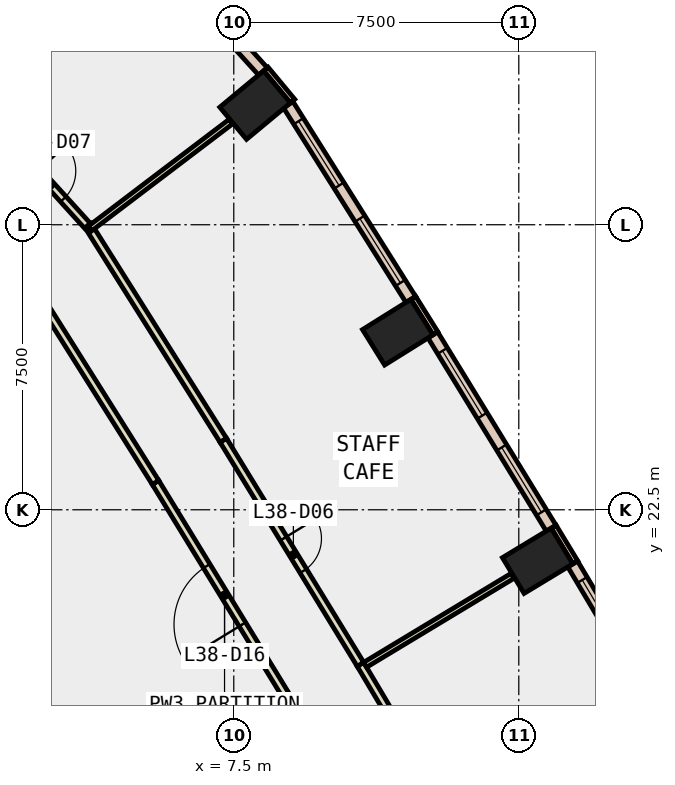
"""IFC4 building model, lengths in metres.
Left out: names, types, materials, properties, quantities, classifications, styles, units other than length and angle.
Written with IfcOpenShell. Run it as: python <this file> out.ifc"""

import sys

from ifc_helpers import new_model, si_unit, direction, frame, frame_2d, origin, origin_2d, place, context, subcontext, project, spatial, rectangle, extrude, element, fill, save


model = new_model("IFC4")
c1 = context("Model", 3, precision=1e-05, world=origin(), true_north=direction((0.0, 1.0)))
c2 = subcontext(c1, "Body", "Model", "MODEL_VIEW")
j1 = project(units=[si_unit("LENGTHUNIT", "METRE"), si_unit("PLANEANGLEUNIT", "RADIAN")], contexts=[c1])
p1 = place(None, origin())
s1 = spatial("IfcSite", under=j1, at=p1, CompositionType="ELEMENT")
p2 = place(p1, origin())
s2 = spatial("IfcBuilding", under=s1, at=p2, CompositionType="ELEMENT")
p3 = place(p2, frame((0.0, 0.0, 171.8)))
s3 = spatial("IfcBuildingStorey", under=s2, at=p3, CompositionType="ELEMENT", Elevation=171.8)
for number, where, z_axis, x_axis in (
    (1, (15.496, 21.158, -0.4), (0.0, 0.0, 1.0), (-0.518, 0.855, 0.0)),
    (2, (11.815, 27.172, -0.4), (0.0, 0.0, 1.0), (-0.53, 0.848, 0.0)),
    (3, (8.061, 33.149, -0.4), (0.0, 0.0, 1.0), (-0.639, 0.769, 0.0)),
):
    element("IfcColumn", number, at=place(p3, frame(where, z_axis=z_axis, x_axis=x_axis)), inside=s3, PredefinedType="COLUMN", context=c2, shape_type="SweptSolid", body=[
        extrude(rectangle(XDim=1.1, YDim=1.5, at=origin_2d()), origin(), (0.0, 0.0, 1.0), 4.2),
    ])
for number, where, z_axis, x_axis in (
    (4, (16.487, 21.115, 0.0), (0.0, 0.0, 1.0), (-0.518, 0.855, 0.0)),
    (5, (12.806, 27.143, 0.0), (0.0, 0.0, 1.0), (-0.53, 0.848, 0.0)),
    (6, (9.047, 33.253, 0.0), (0.0, 0.0, 1.0), (-0.639, 0.769, 0.0)),
):
    element("IfcWall", number, at=place(p3, frame(where, z_axis=z_axis, x_axis=x_axis)), inside=s3, PredefinedType="STANDARD", context=c2, shape_type="SweptSolid", body=[
        extrude(rectangle(XDim=1.1, YDim=0.15, at=frame_2d((0.55, 0.0))), origin(), (0.0, 0.0, 1.0), 3.8),
    ])
p4 = place(p3, frame((19.465, 15.949, 0.0), z_axis=(0.0, 0.0, 1.0), x_axis=(-0.511053317394, 0.8595490136, 0.0)))
e7 = element("IfcWall", 7, at=p4, inside=s3, PredefinedType="STANDARD", context=c2, shape_type="SweptSolid", body=[
    extrude(rectangle(XDim=5.962, YDim=0.3, at=frame_2d((2.981, 0.0))), origin(), (0.0, 0.0, 1.0), 3.8),
])
p5 = place(p4, frame((0.491, 0.0, 0.9)))
e8 = element("IfcOpeningElement", 8, at=p5, cuts=e7, PredefinedType="OPENING", context=c2, shape_type="SweptSolid", body=[
    extrude(rectangle(XDim=2.0, YDim=2.6, at=frame_2d((1.0, 1.3))), frame((0.0, 0.16, 0.0), z_axis=(0.0, -1.0, 0.0), x_axis=(1.0, 0.0, 0.0)), (0.0, 0.0, 1.0), 0.32),
])
p6 = place(p4, frame((3.472, 0.0, 0.9)))
e9 = element("IfcOpeningElement", 9, at=p6, cuts=e7, PredefinedType="OPENING", context=c2, shape_type="SweptSolid", body=[
    extrude(rectangle(XDim=2.0, YDim=2.6, at=frame_2d((1.0, 1.3))), frame((0.0, 0.16, 0.0), z_axis=(0.0, -1.0, 0.0), x_axis=(1.0, 0.0, 0.0)), (0.0, 0.0, 1.0), 0.32),
])
p7 = place(p3, frame((15.851, 22.015, 0.0), z_axis=(0.0, 0.0, 1.0), x_axis=(-0.522156898008, 0.852849443842, 0.0)))
e10 = element("IfcWall", 10, at=p7, inside=s3, PredefinedType="STANDARD", context=c2, shape_type="SweptSolid", body=[
    extrude(rectangle(XDim=5.964, YDim=0.3, at=frame_2d((2.982, 0.0))), origin(), (0.0, 0.0, 1.0), 3.8),
])
p8 = place(p7, frame((0.491, 0.0, 0.9)))
e11 = element("IfcOpeningElement", 11, at=p8, cuts=e10, PredefinedType="OPENING", context=c2, shape_type="SweptSolid", body=[
    extrude(rectangle(XDim=2.0, YDim=2.6, at=frame_2d((1.0, 1.3))), frame((0.0, 0.16, 0.0), z_axis=(0.0, -1.0, 0.0), x_axis=(1.0, 0.0, 0.0)), (0.0, 0.0, 1.0), 0.32),
])
p9 = place(p7, frame((3.473, 0.0, 0.9)))
e12 = element("IfcOpeningElement", 12, at=p9, cuts=e10, PredefinedType="OPENING", context=c2, shape_type="SweptSolid", body=[
    extrude(rectangle(XDim=2.0, YDim=2.6, at=frame_2d((1.0, 1.3))), frame((0.0, 0.16, 0.0), z_axis=(0.0, -1.0, 0.0), x_axis=(1.0, 0.0, 0.0)), (0.0, 0.0, 1.0), 0.32),
])
p10 = place(p3, frame((12.158, 28.034, 0.0), z_axis=(0.0, 0.0, 1.0), x_axis=(-0.532721310512, 0.846290733334, 0.0)))
e13 = element("IfcWall", 13, at=p10, inside=s3, PredefinedType="STANDARD", context=c2, shape_type="SweptSolid", body=[
    extrude(rectangle(XDim=6.056, YDim=0.3, at=frame_2d((3.028, 0.0))), origin(), (0.0, 0.0, 1.0), 3.8),
])
p11 = place(p10, frame((0.514, 0.0, 0.9)))
e14 = element("IfcOpeningElement", 14, at=p11, cuts=e13, PredefinedType="OPENING", context=c2, shape_type="SweptSolid", body=[
    extrude(rectangle(XDim=2.0, YDim=2.6, at=frame_2d((1.0, 1.3))), frame((0.0, 0.16, 0.0), z_axis=(0.0, -1.0, 0.0), x_axis=(1.0, 0.0, 0.0)), (0.0, 0.0, 1.0), 0.32),
])
p12 = place(p10, frame((3.542, 0.0, 0.9)))
e15 = element("IfcOpeningElement", 15, at=p12, cuts=e13, PredefinedType="OPENING", context=c2, shape_type="SweptSolid", body=[
    extrude(rectangle(XDim=2.0, YDim=2.6, at=frame_2d((1.0, 1.3))), frame((0.0, 0.16, 0.0), z_axis=(0.0, -1.0, 0.0), x_axis=(1.0, 0.0, 0.0)), (0.0, 0.0, 1.0), 0.32),
])
p13 = place(p3, frame((8.268, 34.035, 0.0), z_axis=(0.0, 0.0, 1.0), x_axis=(-0.672034341329, 0.740519982225, 0.0)))
e16 = element("IfcWall", 16, at=p13, inside=s3, PredefinedType="STANDARD", context=c2, shape_type="SweptSolid", body=[
    extrude(rectangle(XDim=4.018, YDim=0.3, at=frame_2d((2.009, 0.0))), origin(), (0.0, 0.0, 1.0), 3.8),
])
p14 = place(p13, frame((1.309, 0.0, 0.9)))
e17 = element("IfcOpeningElement", 17, at=p14, cuts=e16, PredefinedType="OPENING", context=c2, shape_type="SweptSolid", body=[
    extrude(rectangle(XDim=1.4, YDim=2.6, at=frame_2d((0.7, 1.3))), frame((0.0, 0.16, 0.0), z_axis=(0.0, -1.0, 0.0), x_axis=(1.0, 0.0, 0.0)), (0.0, 0.0, 1.0), 0.32),
])
p15 = place(p3, frame((9.073, 17.285, 0.0), z_axis=(0.0, 0.0, 1.0), x_axis=(-0.522108536257, 0.85287905143, 0.0)))
e18 = element("IfcWall", 18, at=p15, inside=s3, PredefinedType="PARTITIONING", context=c2, shape_type="SweptSolid", body=[
    extrude(rectangle(XDim=6.957, YDim=0.2, at=frame_2d((3.478, 0.0))), origin(), (0.0, 0.0, 1.0), 3.8),
])
p16 = place(p15, frame((2.578, 0.0, 0.0)))
e19 = element("IfcOpeningElement", 19, at=p16, cuts=e18, PredefinedType="OPENING", context=c2, shape_type="SweptSolid", body=[
    extrude(rectangle(XDim=1.8, YDim=2.1, at=frame_2d((0.9, 1.05))), frame((0.0, 0.11, 0.0), z_axis=(0.0, -1.0, 0.0), x_axis=(1.0, 0.0, 0.0)), (0.0, 0.0, 1.0), 0.22),
])
p17 = place(p3, frame((5.441, 23.218, 0.0), z_axis=(0.0, 0.0, 1.0), x_axis=(-0.532786324951, 0.846249804694, 0.0)))
e20 = element("IfcWall", 20, at=p17, inside=s3, PredefinedType="PARTITIONING", context=c2, shape_type="SweptSolid", body=[
    extrude(rectangle(XDim=6.489, YDim=0.2, at=frame_2d((3.244, 0.0))), origin(), (0.0, 0.0, 1.0), 3.8),
])
p18 = place(p3, frame((10.833, 18.434, 0.0), z_axis=(0.0, 0.0, 1.0), x_axis=(0.510975915649, -0.859595028852, 0.0)))
e21 = element("IfcWall", 21, at=p18, inside=s3, PredefinedType="PARTITIONING", context=c2, shape_type="SweptSolid", body=[
    extrude(rectangle(XDim=7.057, YDim=0.2, at=frame_2d((3.528, 0.0))), origin(), (0.0, 0.0, 1.0), 3.8),
])
p19 = place(p18, frame((3.028, 0.0, 0.0)))
e22 = element("IfcOpeningElement", 22, at=p19, cuts=e21, PredefinedType="OPENING", context=c2, shape_type="SweptSolid", body=[
    extrude(rectangle(XDim=1.0, YDim=2.1, at=frame_2d((0.5, 1.05))), frame((0.0, 0.11, 0.0), z_axis=(0.0, -1.0, 0.0), x_axis=(1.0, 0.0, 0.0)), (0.0, 0.0, 1.0), 0.22),
])
p20 = place(p3, frame((3.663, 29.984, 0.0), z_axis=(0.0, 0.0, 1.0), x_axis=(0.532874279134, -0.846194423662, 0.0)))
e23 = element("IfcWall", 23, at=p20, inside=s3, PredefinedType="PARTITIONING", context=c2, shape_type="SweptSolid", body=[
    extrude(rectangle(XDim=6.686, YDim=0.2, at=frame_2d((3.343, 0.0))), origin(), (0.0, 0.0, 1.0), 3.8),
])
p21 = place(p3, frame((7.226, 24.326, 0.0), z_axis=(0.0, 0.0, 1.0), x_axis=(0.52212028524, -0.852871858922, 0.0)))
e24 = element("IfcWall", 24, at=p21, inside=s3, PredefinedType="PARTITIONING", context=c2, shape_type="SweptSolid", body=[
    extrude(rectangle(XDim=6.908, YDim=0.2, at=frame_2d((3.454, 0.0))), origin(), (0.0, 0.0, 1.0), 3.8),
])
p22 = place(p21, frame((3.029, 0.0, 0.0)))
e25 = element("IfcOpeningElement", 25, at=p22, cuts=e24, PredefinedType="OPENING", context=c2, shape_type="SweptSolid", body=[
    extrude(rectangle(XDim=1.0, YDim=2.1, at=frame_2d((0.5, 1.05))), frame((0.0, 0.11, 0.0), z_axis=(0.0, -1.0, 0.0), x_axis=(1.0, 0.0, 0.0)), (0.0, 0.0, 1.0), 0.22),
])
p23 = place(p3, frame((1.708, 32.112, 0.0), z_axis=(0.0, 0.0, 1.0), x_axis=(0.671957285765, -0.740589904135, 0.0)))
e26 = element("IfcWall", 26, at=p23, inside=s3, PredefinedType="PARTITIONING", context=c2, shape_type="SweptSolid", body=[
    extrude(rectangle(XDim=2.888, YDim=0.2, at=frame_2d((1.444, 0.0))), origin(), (0.0, 0.0, 1.0), 3.8),
])
p24 = place(p23, frame((0.944, 0.0, 0.0)))
e27 = element("IfcOpeningElement", 27, at=p24, cuts=e26, PredefinedType="OPENING", context=c2, shape_type="SweptSolid", body=[
    extrude(rectangle(XDim=1.0, YDim=2.1, at=frame_2d((0.5, 1.05))), frame((0.0, 0.11, 0.0), z_axis=(0.0, -1.0, 0.0), x_axis=(1.0, 0.0, 0.0)), (0.0, 0.0, 1.0), 0.22),
])
p25 = place(p3, frame((10.957, 18.421, 0.0), z_axis=(0.0, 0.0, 1.0), x_axis=(0.85624931053, 0.516562792134, 0.0)))
e28 = element("IfcWall", 28, at=p25, inside=s3, PredefinedType="PARTITIONING", context=c2, shape_type="SweptSolid", body=[
    extrude(rectangle(XDim=4.53, YDim=0.15, at=frame_2d((2.265, 0.0))), origin(), (0.0, 0.0, 1.0), 3.8),
])
p26 = place(p3, frame((3.716, 29.899, 0.0), z_axis=(0.0, 0.0, 1.0), x_axis=(0.796435085709, 0.604724031481, 0.0)))
e29 = element("IfcWall", 29, at=p26, inside=s3, PredefinedType="PARTITIONING", context=c2, shape_type="SweptSolid", body=[
    extrude(rectangle(XDim=4.653, YDim=0.15, at=frame_2d((2.327, 0.0))), origin(), (0.0, 0.0, 1.0), 3.8),
])
p27 = place(p6, origin())
e30 = element("IfcWindow", 30, at=p27, inside=s3, PartitioningType="SINGLE_PANEL", PredefinedType="WINDOW", context=c2, shape_type="SweptSolid", body=[
    extrude(rectangle(XDim=2.0, YDim=2.6, at=frame_2d((1.0, 1.3))), frame((0.0, 0.03, 0.0), z_axis=(0.0, -1.0, 0.0), x_axis=(1.0, 0.0, 0.0)), (0.0, 0.0, 1.0), 0.06),
])
fill(e9, e30)
p28 = place(p8, origin())
e31 = element("IfcWindow", 31, at=p28, inside=s3, PartitioningType="SINGLE_PANEL", PredefinedType="WINDOW", context=c2, shape_type="SweptSolid", body=[
    extrude(rectangle(XDim=2.0, YDim=2.6, at=frame_2d((1.0, 1.3))), frame((0.0, 0.03, 0.0), z_axis=(0.0, -1.0, 0.0), x_axis=(1.0, 0.0, 0.0)), (0.0, 0.0, 1.0), 0.06),
])
fill(e11, e31)
p29 = place(p9, origin())
e32 = element("IfcWindow", 32, at=p29, inside=s3, PartitioningType="SINGLE_PANEL", PredefinedType="WINDOW", context=c2, shape_type="SweptSolid", body=[
    extrude(rectangle(XDim=2.0, YDim=2.6, at=frame_2d((1.0, 1.3))), frame((0.0, 0.03, 0.0), z_axis=(0.0, -1.0, 0.0), x_axis=(1.0, 0.0, 0.0)), (0.0, 0.0, 1.0), 0.06),
])
fill(e12, e32)
p30 = place(p11, origin())
e33 = element("IfcWindow", 33, at=p30, inside=s3, PartitioningType="SINGLE_PANEL", PredefinedType="WINDOW", context=c2, shape_type="SweptSolid", body=[
    extrude(rectangle(XDim=2.0, YDim=2.6, at=frame_2d((1.0, 1.3))), frame((0.0, 0.03, 0.0), z_axis=(0.0, -1.0, 0.0), x_axis=(1.0, 0.0, 0.0)), (0.0, 0.0, 1.0), 0.06),
])
fill(e14, e33)
p31 = place(p12, origin())
e34 = element("IfcWindow", 34, at=p31, inside=s3, PartitioningType="SINGLE_PANEL", PredefinedType="WINDOW", context=c2, shape_type="SweptSolid", body=[
    extrude(rectangle(XDim=2.0, YDim=2.6, at=frame_2d((1.0, 1.3))), frame((0.0, 0.03, 0.0), z_axis=(0.0, -1.0, 0.0), x_axis=(1.0, 0.0, 0.0)), (0.0, 0.0, 1.0), 0.06),
])
fill(e15, e34)
p32 = place(p22, origin())
e35 = element("IfcDoor", 35, at=p32, inside=s3, OperationType="SINGLE_SWING_RIGHT", PredefinedType="DOOR", context=c2, shape_type="SweptSolid", body=[
    extrude(rectangle(XDim=1.0, YDim=2.1, at=frame_2d((0.5, 1.05))), frame((0.0, 0.025, 0.0), z_axis=(0.0, -1.0, 0.0), x_axis=(1.0, 0.0, 0.0)), (0.0, 0.0, 1.0), 0.05),
])
fill(e25, e35)
p33 = place(p24, origin())
e36 = element("IfcDoor", 36, at=p33, inside=s3, OperationType="SINGLE_SWING_LEFT", PredefinedType="DOOR", context=c2, shape_type="SweptSolid", body=[
    extrude(rectangle(XDim=1.0, YDim=2.1, at=frame_2d((0.5, 1.05))), frame((0.0, 0.025, 0.0), z_axis=(0.0, -1.0, 0.0), x_axis=(1.0, 0.0, 0.0)), (0.0, 0.0, 1.0), 0.05),
])
fill(e27, e36)
p34 = place(p16, origin())
e37 = element("IfcDoor", 37, at=p34, inside=s3, OperationType="DOUBLE_DOOR_SINGLE_SWING", PredefinedType="DOOR", context=c2, shape_type="SweptSolid", body=[
    extrude(rectangle(XDim=1.8, YDim=2.1, at=frame_2d((0.9, 1.05))), frame((0.0, 0.025, 0.0), z_axis=(0.0, -1.0, 0.0), x_axis=(1.0, 0.0, 0.0)), (0.0, 0.0, 1.0), 0.05),
])
fill(e19, e37)
save(model, sys.argv[1])
